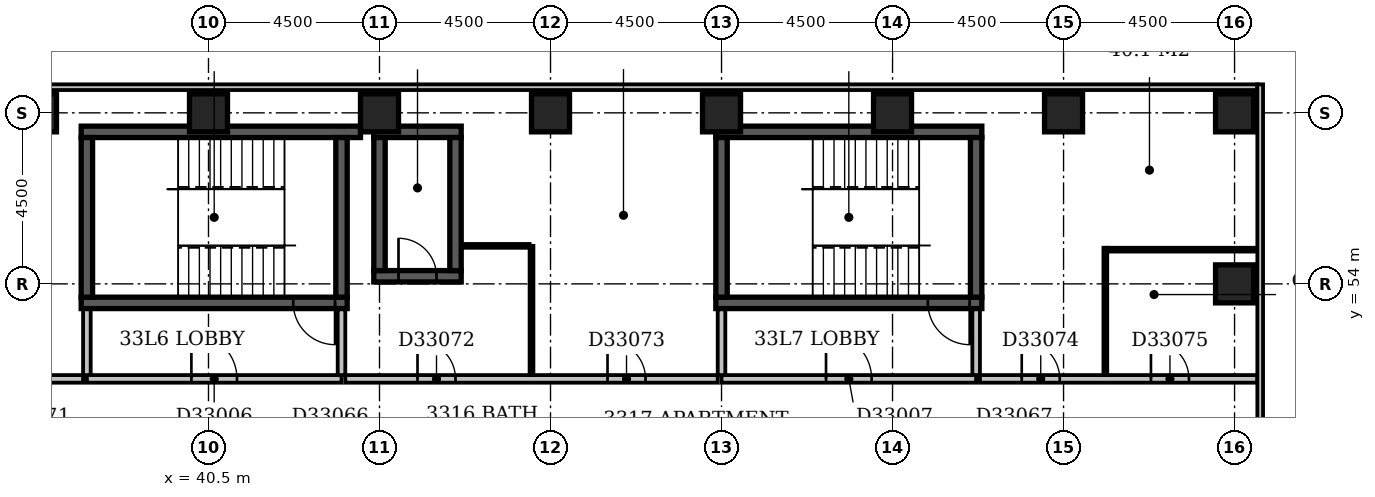
"""IFC4 building model, lengths in metres.
Left out: names, types, materials, properties, quantities, classifications, styles, units other than length and angle.
Written with IfcOpenShell. Run it as: python <this file> out.ifc"""

import sys

from ifc_helpers import new_model, si_unit, direction, frame, frame_2d, origin, origin_2d, place, context, subcontext, project, spatial, rectangle, extrude, element, fill, save


model = new_model("IFC4")
c1 = context("Model", 3, precision=1e-05, world=origin(), true_north=direction((0.0, 1.0)))
c2 = subcontext(c1, "Body", "Model", "MODEL_VIEW")
j1 = project(units=[si_unit("LENGTHUNIT", "METRE"), si_unit("PLANEANGLEUNIT", "RADIAN")], contexts=[c1])
p1 = place(None, origin())
s1 = spatial("IfcSite", under=j1, at=p1, CompositionType="ELEMENT")
p2 = place(p1, origin())
s2 = spatial("IfcBuilding", under=s1, at=p2, CompositionType="ELEMENT")
p3 = place(p2, frame((0.0, 0.0, 134.0)))
s3 = spatial("IfcBuildingStorey", under=s2, at=p3, CompositionType="ELEMENT", Elevation=134.0)
p4 = place(p3, frame((37.15, 53.5, -0.3), z_axis=(0.0, 0.0, 1.0), x_axis=(1.0, 0.0, 0.0)))
e1 = element("IfcWall", 1, at=p4, inside=s3, PredefinedType="SHEAR", context=c2, shape_type="SweptSolid", body=[
    extrude(rectangle(XDim=7.0, YDim=0.3, at=frame_2d((3.5, 0.0))), origin(), (0.0, 0.0, 1.0), 3.6),
])
p5 = place(p4, frame((5.58, 0.0, 0.3)))
e2 = element("IfcOpeningElement", 2, at=p5, cuts=e1, PredefinedType="OPENING", context=c2, shape_type="SweptSolid", body=[
    extrude(rectangle(XDim=1.1, YDim=2.1, at=frame_2d((0.55, 1.05))), frame((0.0, 0.162, 0.0), z_axis=(0.0, -1.0, 0.0), x_axis=(1.0, 0.0, 0.0)), (0.0, 0.0, 1.0), 0.324),
])
p6 = place(p3, frame((37.15, 58.0, -0.3), z_axis=(0.0, 0.0, 1.0), x_axis=(1.0, 0.0, 0.0)))
e3 = element("IfcWall", 3, at=p6, inside=s3, PredefinedType="SHEAR", context=c2, shape_type="SweptSolid", body=[
    extrude(rectangle(XDim=7.35, YDim=0.3, at=frame_2d((3.675, 0.0))), origin(), (0.0, 0.0, 1.0), 3.6),
])
for number, where, z_axis, x_axis in (
    (4, (37.3, 53.65, -0.3), (0.0, 0.0, 1.0), (0.0, 1.0, 0.0)),
    (5, (44.0, 53.65, -0.3), (0.0, 0.0, 1.0), (0.0, 1.0, 0.0)),
):
    element("IfcWall", number, at=place(p3, frame(where, z_axis=z_axis, x_axis=x_axis)), inside=s3, PredefinedType="SHEAR", context=c2, shape_type="SweptSolid", body=[
        extrude(rectangle(XDim=4.2, YDim=0.3, at=frame_2d((2.1, 0.0))), origin(), (0.0, 0.0, 1.0), 3.6),
    ])
p7 = place(p3, frame((44.85, 54.2, -0.3), z_axis=(0.0, 0.0, 1.0), x_axis=(1.0, 0.0, 0.0)))
e6 = element("IfcWall", 6, at=p7, inside=s3, PredefinedType="SHEAR", context=c2, shape_type="SweptSolid", body=[
    extrude(rectangle(XDim=2.3, YDim=0.3, at=frame_2d((1.15, 0.0))), origin(), (0.0, 0.0, 1.0), 3.6),
])
p8 = place(p7, frame((0.65, 0.0, 0.3)))
e7 = element("IfcOpeningElement", 7, at=p8, cuts=e6, PredefinedType="OPENING", context=c2, shape_type="SweptSolid", body=[
    extrude(rectangle(XDim=1.0, YDim=2.1, at=frame_2d((0.5, 1.05))), frame((0.0, 0.162, 0.0), z_axis=(0.0, -1.0, 0.0), x_axis=(1.0, 0.0, 0.0)), (0.0, 0.0, 1.0), 0.324),
])
p9 = place(p3, frame((44.85, 58.0, -0.3), z_axis=(0.0, 0.0, 1.0), x_axis=(1.0, 0.0, 0.0)))
e8 = element("IfcWall", 8, at=p9, inside=s3, PredefinedType="SHEAR", context=c2, shape_type="SweptSolid", body=[
    extrude(rectangle(XDim=2.3, YDim=0.3, at=frame_2d((1.15, 0.0))), origin(), (0.0, 0.0, 1.0), 3.6),
])
for number, where, z_axis, x_axis in (
    (9, (45.0, 54.35, -0.3), (0.0, 0.0, 1.0), (0.0, 1.0, 0.0)),
    (10, (47.0, 54.35, -0.3), (0.0, 0.0, 1.0), (0.0, 1.0, 0.0)),
):
    element("IfcWall", number, at=place(p3, frame(where, z_axis=z_axis, x_axis=x_axis)), inside=s3, PredefinedType="SHEAR", context=c2, shape_type="SweptSolid", body=[
        extrude(rectangle(XDim=3.5, YDim=0.3, at=frame_2d((1.75, 0.0))), origin(), (0.0, 0.0, 1.0), 3.6),
    ])
p10 = place(p3, frame((53.85, 53.5, -0.3), z_axis=(0.0, 0.0, 1.0), x_axis=(1.0, 0.0, 0.0)))
e11 = element("IfcWall", 11, at=p10, inside=s3, PredefinedType="SHEAR", context=c2, shape_type="SweptSolid", body=[
    extrude(rectangle(XDim=7.0, YDim=0.3, at=frame_2d((3.5, 0.0))), origin(), (0.0, 0.0, 1.0), 3.6),
])
p11 = place(p10, frame((5.58, 0.0, 0.3)))
e12 = element("IfcOpeningElement", 12, at=p11, cuts=e11, PredefinedType="OPENING", context=c2, shape_type="SweptSolid", body=[
    extrude(rectangle(XDim=1.1, YDim=2.1, at=frame_2d((0.55, 1.05))), frame((0.0, 0.162, 0.0), z_axis=(0.0, -1.0, 0.0), x_axis=(1.0, 0.0, 0.0)), (0.0, 0.0, 1.0), 0.324),
])
p12 = place(p3, frame((53.85, 58.0, -0.3), z_axis=(0.0, 0.0, 1.0), x_axis=(1.0, 0.0, 0.0)))
e13 = element("IfcWall", 13, at=p12, inside=s3, PredefinedType="SHEAR", context=c2, shape_type="SweptSolid", body=[
    extrude(rectangle(XDim=7.0, YDim=0.3, at=frame_2d((3.5, 0.0))), origin(), (0.0, 0.0, 1.0), 3.6),
])
for number, where, z_axis, x_axis in (
    (14, (54.0, 53.65, -0.3), (0.0, 0.0, 1.0), (0.0, 1.0, 0.0)),
    (15, (60.7, 53.65, -0.3), (0.0, 0.0, 1.0), (0.0, 1.0, 0.0)),
):
    element("IfcWall", number, at=place(p3, frame(where, z_axis=z_axis, x_axis=x_axis)), inside=s3, PredefinedType="SHEAR", context=c2, shape_type="SweptSolid", body=[
        extrude(rectangle(XDim=4.2, YDim=0.3, at=frame_2d((2.1, 0.0))), origin(), (0.0, 0.0, 1.0), 3.6),
    ])
for number, where, z_axis, x_axis in (
    (16, (67.5, 54.0, -0.3), (0.0, 0.0, 1.0), (1.0, 0.0, 0.0)),
    (17, (36.0, 58.5, -0.3), (0.0, 0.0, 1.0), (1.0, 0.0, 0.0)),
    (18, (40.5, 58.5, -0.3), (0.0, 0.0, 1.0), (1.0, 0.0, 0.0)),
    (19, (45.0, 58.5, -0.3), (0.0, 0.0, 1.0), (1.0, 0.0, 0.0)),
    (20, (49.5, 58.5, -0.3), (0.0, 0.0, 1.0), (1.0, 0.0, 0.0)),
    (21, (54.0, 58.5, -0.3), (0.0, 0.0, 1.0), (1.0, 0.0, 0.0)),
    (22, (58.5, 58.5, -0.3), (0.0, 0.0, 1.0), (1.0, 0.0, 0.0)),
    (23, (63.0, 58.5, -0.3), (0.0, 0.0, 1.0), (1.0, 0.0, 0.0)),
    (24, (67.5, 58.5, -0.3), (0.0, 0.0, 1.0), (1.0, 0.0, 0.0)),
):
    element("IfcColumn", number, at=place(p3, frame(where, z_axis=z_axis, x_axis=x_axis)), inside=s3, PredefinedType="COLUMN", context=c2, shape_type="SweptSolid", body=[
        extrude(rectangle(XDim=1.0, YDim=1.0, at=origin_2d()), origin(), (0.0, 0.0, 1.0), 3.6),
    ])
p13 = place(p3, frame((68.175, 35.4, 0.0), z_axis=(0.0, 0.0, 1.0), x_axis=(0.0, 1.0, 0.0)))
e25 = element("IfcWall", 25, at=p13, inside=s3, PredefinedType="STANDARD", context=c2, shape_type="SweptSolid", body=[
    extrude(rectangle(XDim=23.85, YDim=0.15, at=frame_2d((11.925, 0.0))), origin(), (0.0, 0.0, 1.0), 2.7),
])
p14 = place(p13, frame((1.354, 0.0, 0.6)))
e26 = element("IfcOpeningElement", 26, at=p14, cuts=e25, PredefinedType="OPENING", context=c2, shape_type="SweptSolid", body=[
    extrude(rectangle(XDim=1.5, YDim=1.8, at=frame_2d((0.75, 0.9))), frame((0.0, 0.087, 0.0), z_axis=(0.0, -1.0, 0.0), x_axis=(1.0, 0.0, 0.0)), (0.0, 0.0, 1.0), 0.174),
])
p15 = place(p13, frame((10.65, 0.0, 0.6)))
e27 = element("IfcOpeningElement", 27, at=p15, cuts=e25, PredefinedType="OPENING", context=c2, shape_type="SweptSolid", body=[
    extrude(rectangle(XDim=2.4, YDim=1.8, at=frame_2d((1.2, 0.9))), frame((0.0, 0.087, 0.0), z_axis=(0.0, -1.0, 0.0), x_axis=(1.0, 0.0, 0.0)), (0.0, 0.0, 1.0), 0.174),
])
p16 = place(p3, frame((68.1, 59.175, 0.0), z_axis=(0.0, 0.0, 1.0), x_axis=(-1.0, 0.0, 0.0)))
e28 = element("IfcWall", 28, at=p16, inside=s3, PredefinedType="STANDARD", context=c2, shape_type="SweptSolid", body=[
    extrude(rectangle(XDim=68.85, YDim=0.15, at=frame_2d((34.425, 0.0))), origin(), (0.0, 0.0, 1.0), 2.7),
])
p17 = place(p3, frame((37.3, 51.5, 0.0), z_axis=(0.0, 0.0, 1.0), x_axis=(1.0, 0.0, 0.0)))
e29 = element("IfcWall", 29, at=p17, inside=s3, PredefinedType="PARTITIONING", context=c2, shape_type="SweptSolid", body=[
    extrude(rectangle(XDim=6.7, YDim=0.2, at=frame_2d((3.35, 0.0))), origin(), (0.0, 0.0, 1.0), 3.3),
])
p18 = place(p17, frame((2.75, 0.0, 0.0)))
e30 = element("IfcOpeningElement", 30, at=p18, cuts=e29, PredefinedType="OPENING", context=c2, shape_type="SweptSolid", body=[
    extrude(rectangle(XDim=1.2, YDim=2.1, at=frame_2d((0.6, 1.05))), frame((0.0, 0.112, 0.0), z_axis=(0.0, -1.0, 0.0), x_axis=(1.0, 0.0, 0.0)), (0.0, 0.0, 1.0), 0.224),
])
for number, where, z_axis, x_axis in (
    (31, (44.0, 51.6, 0.0), (0.0, 0.0, 1.0), (0.0, 1.0, 0.0)),
    (32, (37.3, 51.6, 0.0), (0.0, 0.0, 1.0), (0.0, 1.0, 0.0)),
):
    element("IfcWall", number, at=place(p3, frame(where, z_axis=z_axis, x_axis=x_axis)), inside=s3, PredefinedType="PARTITIONING", context=c2, shape_type="SweptSolid", body=[
        extrude(rectangle(XDim=1.73, YDim=0.2, at=frame_2d((0.865, 0.0))), origin(), (0.0, 0.0, 1.0), 3.3),
    ])
p19 = place(p3, frame((54.0, 51.5, 0.0), z_axis=(0.0, 0.0, 1.0), x_axis=(1.0, 0.0, 0.0)))
e33 = element("IfcWall", 33, at=p19, inside=s3, PredefinedType="PARTITIONING", context=c2, shape_type="SweptSolid", body=[
    extrude(rectangle(XDim=6.7, YDim=0.2, at=frame_2d((3.35, 0.0))), origin(), (0.0, 0.0, 1.0), 3.3),
])
p20 = place(p19, frame((2.75, 0.0, 0.0)))
e34 = element("IfcOpeningElement", 34, at=p20, cuts=e33, PredefinedType="OPENING", context=c2, shape_type="SweptSolid", body=[
    extrude(rectangle(XDim=1.2, YDim=2.1, at=frame_2d((0.6, 1.05))), frame((0.0, 0.112, 0.0), z_axis=(0.0, -1.0, 0.0), x_axis=(1.0, 0.0, 0.0)), (0.0, 0.0, 1.0), 0.224),
])
p21 = place(p3, frame((60.7, 51.6, 0.0), z_axis=(0.0, 0.0, 1.0), x_axis=(0.0, 1.0, 0.0)))
e35 = element("IfcWall", 35, at=p21, inside=s3, PredefinedType="PARTITIONING", context=c2, shape_type="SweptSolid", body=[
    extrude(rectangle(XDim=1.73, YDim=0.2, at=frame_2d((0.865, 0.0))), origin(), (0.0, 0.0, 1.0), 3.3),
])
p22 = place(p3, frame((54.0, 51.6, 0.0), z_axis=(0.0, 0.0, 1.0), x_axis=(0.0, 1.0, 0.0)))
e36 = element("IfcWall", 36, at=p22, inside=s3, PredefinedType="PARTITIONING", context=c2, shape_type="SweptSolid", body=[
    extrude(rectangle(XDim=1.73, YDim=0.2, at=frame_2d((0.865, 0.0))), origin(), (0.0, 0.0, 1.0), 2.6),
])
p23 = place(p3, frame((27.9, 51.5, 0.0), z_axis=(0.0, 0.0, 1.0), x_axis=(1.0, 0.0, 0.0)))
e37 = element("IfcWall", 37, at=p23, inside=s3, PredefinedType="PARTITIONING", context=c2, shape_type="SweptSolid", body=[
    extrude(rectangle(XDim=9.3, YDim=0.2, at=frame_2d((4.65, 0.0))), origin(), (0.0, 0.0, 1.0), 3.3),
])
p24 = place(p23, frame((1.5, 0.0, 0.0)))
e38 = element("IfcOpeningElement", 38, at=p24, cuts=e37, PredefinedType="OPENING", context=c2, shape_type="SweptSolid", body=[
    extrude(rectangle(XDim=1.0, YDim=2.1, at=frame_2d((0.5, 1.05))), frame((0.0, 0.112, 0.0), z_axis=(0.0, -1.0, 0.0), x_axis=(1.0, 0.0, 0.0)), (0.0, 0.0, 1.0), 0.224),
])
p25 = place(p23, frame((6.3, 0.0, 0.0)))
e39 = element("IfcOpeningElement", 39, at=p25, cuts=e37, PredefinedType="OPENING", context=c2, shape_type="SweptSolid", body=[
    extrude(rectangle(XDim=0.9, YDim=2.1, at=frame_2d((0.45, 1.05))), frame((0.0, 0.112, 0.0), z_axis=(0.0, -1.0, 0.0), x_axis=(1.0, 0.0, 0.0)), (0.0, 0.0, 1.0), 0.224),
])
p26 = place(p3, frame((44.1, 51.5, 0.0), z_axis=(0.0, 0.0, 1.0), x_axis=(1.0, 0.0, 0.0)))
e40 = element("IfcWall", 40, at=p26, inside=s3, PredefinedType="PARTITIONING", context=c2, shape_type="SweptSolid", body=[
    extrude(rectangle(XDim=9.8, YDim=0.2, at=frame_2d((4.9, 0.0))), origin(), (0.0, 0.0, 1.0), 3.3),
])
p27 = place(p26, frame((1.9, 0.0, 0.0)))
e41 = element("IfcOpeningElement", 41, at=p27, cuts=e40, PredefinedType="OPENING", context=c2, shape_type="SweptSolid", body=[
    extrude(rectangle(XDim=1.0, YDim=2.1, at=frame_2d((0.5, 1.05))), frame((0.0, 0.112, 0.0), z_axis=(0.0, -1.0, 0.0), x_axis=(1.0, 0.0, 0.0)), (0.0, 0.0, 1.0), 0.224),
])
p28 = place(p26, frame((6.9, 0.0, 0.0)))
e42 = element("IfcOpeningElement", 42, at=p28, cuts=e40, PredefinedType="OPENING", context=c2, shape_type="SweptSolid", body=[
    extrude(rectangle(XDim=1.0, YDim=2.1, at=frame_2d((0.5, 1.05))), frame((0.0, 0.112, 0.0), z_axis=(0.0, -1.0, 0.0), x_axis=(1.0, 0.0, 0.0)), (0.0, 0.0, 1.0), 0.224),
])
p29 = place(p3, frame((60.8, 51.5, 0.0), z_axis=(0.0, 0.0, 1.0), x_axis=(1.0, 0.0, 0.0)))
e43 = element("IfcWall", 43, at=p29, inside=s3, PredefinedType="PARTITIONING", context=c2, shape_type="SweptSolid", body=[
    extrude(rectangle(XDim=7.3, YDim=0.2, at=frame_2d((3.65, 0.0))), origin(), (0.0, 0.0, 1.0), 3.3),
])
p30 = place(p29, frame((1.1, 0.0, 0.0)))
e44 = element("IfcOpeningElement", 44, at=p30, cuts=e43, PredefinedType="OPENING", context=c2, shape_type="SweptSolid", body=[
    extrude(rectangle(XDim=1.0, YDim=2.1, at=frame_2d((0.5, 1.05))), frame((0.0, 0.112, 0.0), z_axis=(0.0, -1.0, 0.0), x_axis=(1.0, 0.0, 0.0)), (0.0, 0.0, 1.0), 0.224),
])
p31 = place(p29, frame((4.5, 0.0, 0.0)))
e45 = element("IfcOpeningElement", 45, at=p31, cuts=e43, PredefinedType="OPENING", context=c2, shape_type="SweptSolid", body=[
    extrude(rectangle(XDim=1.0, YDim=2.1, at=frame_2d((0.5, 1.05))), frame((0.0, 0.112, 0.0), z_axis=(0.0, -1.0, 0.0), x_axis=(1.0, 0.0, 0.0)), (0.0, 0.0, 1.0), 0.224),
])
p32 = place(p3, frame((49.0, 51.6, 0.0), z_axis=(0.0, 0.0, 1.0), x_axis=(0.0, 1.0, 0.0)))
e46 = element("IfcWall", 46, at=p32, inside=s3, PredefinedType="PARTITIONING", context=c2, shape_type="SweptSolid", body=[
    extrude(rectangle(XDim=3.4, YDim=0.1, at=frame_2d((1.7, 0.0))), origin(), (0.0, 0.0, 1.0), 3.3),
])
p33 = place(p3, frame((64.1, 51.6, 0.0), z_axis=(0.0, 0.0, 1.0), x_axis=(0.0, 1.0, 0.0)))
e47 = element("IfcWall", 47, at=p33, inside=s3, PredefinedType="PARTITIONING", context=c2, shape_type="SweptSolid", body=[
    extrude(rectangle(XDim=3.35, YDim=0.1, at=frame_2d((1.675, 0.0))), origin(), (0.0, 0.0, 1.0), 3.3),
])
p34 = place(p3, frame((64.15, 54.9, 0.0), z_axis=(0.0, 0.0, 1.0), x_axis=(1.0, 0.0, 0.0)))
e48 = element("IfcWall", 48, at=p34, inside=s3, PredefinedType="PARTITIONING", context=c2, shape_type="SweptSolid", body=[
    extrude(rectangle(XDim=3.95, YDim=0.1, at=frame_2d((1.975, 0.0))), origin(), (0.0, 0.0, 1.0), 3.3),
])
p35 = place(p3, frame((47.15, 55.0, 0.0), z_axis=(0.0, 0.0, 1.0), x_axis=(1.0, 0.0, 0.0)))
e49 = element("IfcWall", 49, at=p35, inside=s3, PredefinedType="PARTITIONING", context=c2, shape_type="SweptSolid", body=[
    extrude(rectangle(XDim=1.8, YDim=0.1, at=frame_2d((0.9, 0.0))), origin(), (0.0, 0.0, 1.0), 3.3),
])
p36 = place(p18, origin())
e50 = element("IfcDoor", 50, at=p36, inside=s3, OperationType="SINGLE_SWING_LEFT", PredefinedType="DOOR", context=c2, shape_type="SweptSolid", body=[
    extrude(rectangle(XDim=1.2, YDim=2.1, at=frame_2d((0.6, 1.05))), frame((0.0, 0.025, 0.0), z_axis=(0.0, -1.0, 0.0), x_axis=(1.0, 0.0, 0.0)), (0.0, 0.0, 1.0), 0.05),
])
fill(e30, e50)
p37 = place(p20, origin())
e51 = element("IfcDoor", 51, at=p37, inside=s3, OperationType="SINGLE_SWING_LEFT", PredefinedType="DOOR", context=c2, shape_type="SweptSolid", body=[
    extrude(rectangle(XDim=1.2, YDim=2.1, at=frame_2d((0.6, 1.05))), frame((0.0, 0.025, 0.0), z_axis=(0.0, -1.0, 0.0), x_axis=(1.0, 0.0, 0.0)), (0.0, 0.0, 1.0), 0.05),
])
fill(e34, e51)
p38 = place(p8, origin())
e52 = element("IfcDoor", 52, at=p38, inside=s3, OperationType="SINGLE_SWING_LEFT", PredefinedType="DOOR", context=c2, shape_type="SweptSolid", body=[
    extrude(rectangle(XDim=1.0, YDim=2.1, at=frame_2d((0.5, 1.05))), frame((0.0, 0.025, 0.0), z_axis=(0.0, -1.0, 0.0), x_axis=(1.0, 0.0, 0.0)), (0.0, 0.0, 1.0), 0.05),
])
fill(e7, e52)
p39 = place(p5, origin())
e53 = element("IfcDoor", 53, at=p39, inside=s3, OperationType="SINGLE_SWING_RIGHT", PredefinedType="DOOR", context=c2, shape_type="SweptSolid", body=[
    extrude(rectangle(XDim=1.1, YDim=2.1, at=frame_2d((0.55, 1.05))), frame((0.0, 0.025, 0.0), z_axis=(0.0, -1.0, 0.0), x_axis=(1.0, 0.0, 0.0)), (0.0, 0.0, 1.0), 0.05),
])
fill(e2, e53)
p40 = place(p11, origin())
e54 = element("IfcDoor", 54, at=p40, inside=s3, OperationType="SINGLE_SWING_RIGHT", PredefinedType="DOOR", context=c2, shape_type="SweptSolid", body=[
    extrude(rectangle(XDim=1.1, YDim=2.1, at=frame_2d((0.55, 1.05))), frame((0.0, 0.025, 0.0), z_axis=(0.0, -1.0, 0.0), x_axis=(1.0, 0.0, 0.0)), (0.0, 0.0, 1.0), 0.05),
])
fill(e12, e54)
p41 = place(p27, origin())
e55 = element("IfcDoor", 55, at=p41, inside=s3, OperationType="SINGLE_SWING_LEFT", PredefinedType="DOOR", context=c2, shape_type="SweptSolid", body=[
    extrude(rectangle(XDim=1.0, YDim=2.1, at=frame_2d((0.5, 1.05))), frame((0.0, 0.025, 0.0), z_axis=(0.0, -1.0, 0.0), x_axis=(1.0, 0.0, 0.0)), (0.0, 0.0, 1.0), 0.05),
])
fill(e41, e55)
p42 = place(p28, origin())
e56 = element("IfcDoor", 56, at=p42, inside=s3, OperationType="SINGLE_SWING_LEFT", PredefinedType="DOOR", context=c2, shape_type="SweptSolid", body=[
    extrude(rectangle(XDim=1.0, YDim=2.1, at=frame_2d((0.5, 1.05))), frame((0.0, 0.025, 0.0), z_axis=(0.0, -1.0, 0.0), x_axis=(1.0, 0.0, 0.0)), (0.0, 0.0, 1.0), 0.05),
])
fill(e42, e56)
p43 = place(p30, origin())
e57 = element("IfcDoor", 57, at=p43, inside=s3, OperationType="SINGLE_SWING_LEFT", PredefinedType="DOOR", context=c2, shape_type="SweptSolid", body=[
    extrude(rectangle(XDim=1.0, YDim=2.1, at=frame_2d((0.5, 1.05))), frame((0.0, 0.025, 0.0), z_axis=(0.0, -1.0, 0.0), x_axis=(1.0, 0.0, 0.0)), (0.0, 0.0, 1.0), 0.05),
])
fill(e44, e57)
p44 = place(p31, origin())
e58 = element("IfcDoor", 58, at=p44, inside=s3, OperationType="SINGLE_SWING_LEFT", PredefinedType="DOOR", context=c2, shape_type="SweptSolid", body=[
    extrude(rectangle(XDim=1.0, YDim=2.1, at=frame_2d((0.5, 1.05))), frame((0.0, 0.025, 0.0), z_axis=(0.0, -1.0, 0.0), x_axis=(1.0, 0.0, 0.0)), (0.0, 0.0, 1.0), 0.05),
])
fill(e45, e58)
save(model, sys.argv[1])
